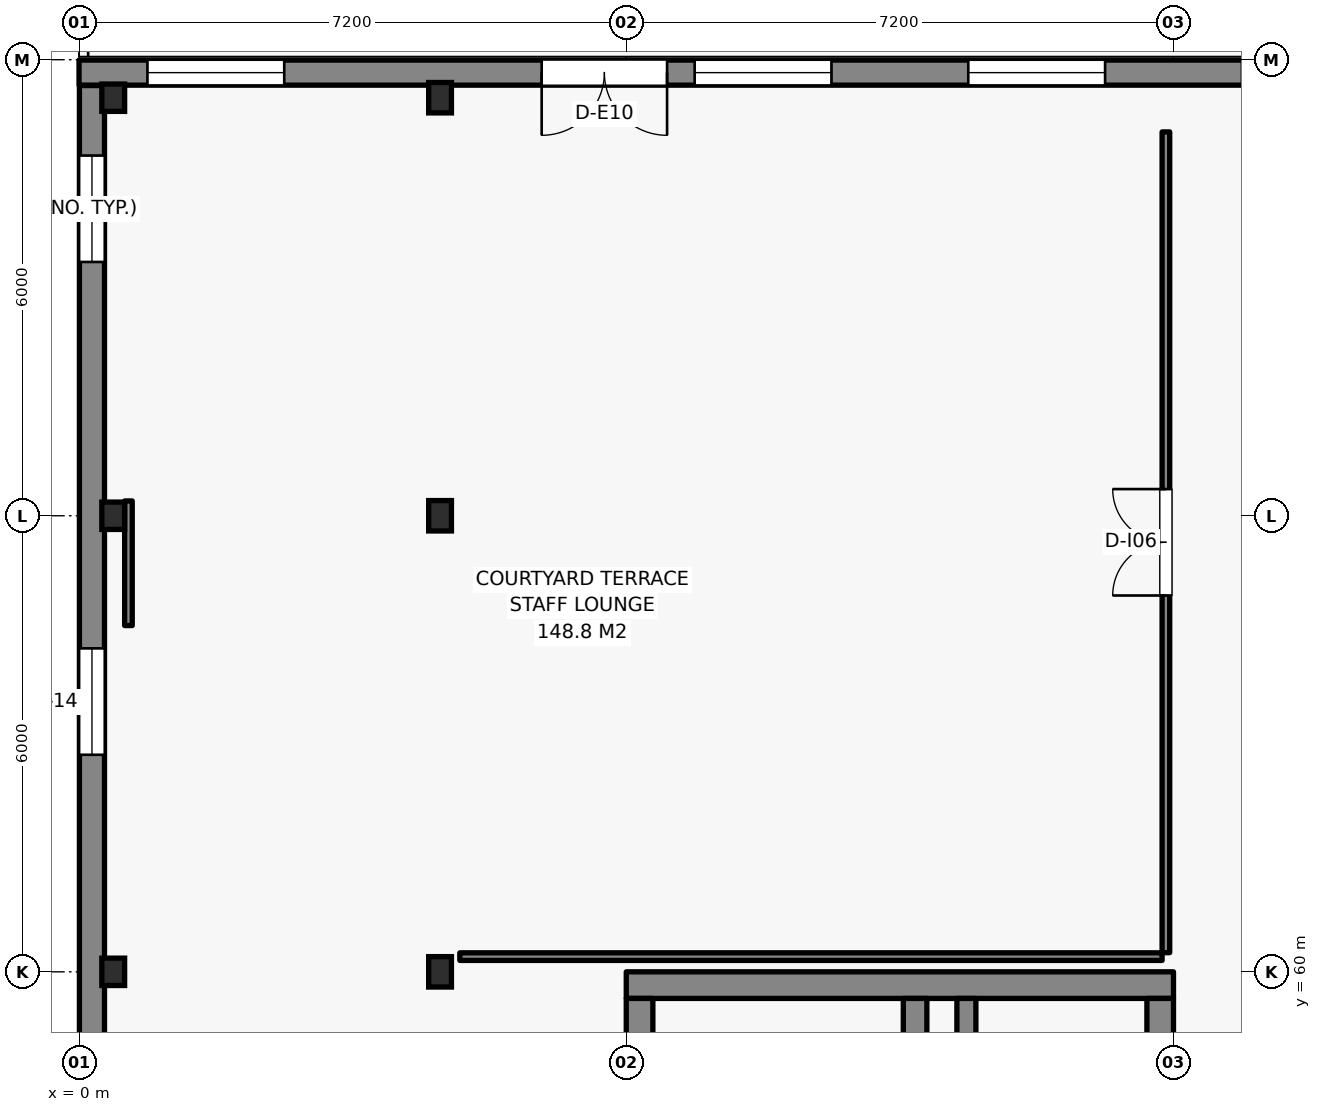
"""IFC4 building model, lengths in metres.
Left out: names, types, materials, properties, quantities, classifications, styles, units other than length and angle.
Written with IfcOpenShell. Run it as: python <this file> out.ifc"""

import sys

from ifc_helpers import new_model, si_unit, direction, frame, frame_2d, origin, origin_2d, place, context, subcontext, project, spatial, rectangle, i_section, extrude, element, fill, save


model = new_model("IFC4")
c1 = context("Model", 3, precision=1e-05, world=origin(), true_north=direction((0.0, 1.0)))
c2 = subcontext(c1, "Body", "Model", "MODEL_VIEW")
j1 = project(units=[si_unit("LENGTHUNIT", "METRE"), si_unit("PLANEANGLEUNIT", "RADIAN")], contexts=[c1])
p1 = place(None, origin())
s1 = spatial("IfcSite", under=j1, at=p1, CompositionType="ELEMENT")
p2 = place(p1, origin())
s2 = spatial("IfcBuilding", under=s1, at=p2, CompositionType="ELEMENT")
p3 = place(p2, frame((0.0, 0.0, 14.7)))
s3 = spatial("IfcBuildingStorey", under=s2, at=p3, CompositionType="ELEMENT", Elevation=14.7)
p4 = place(p3, frame((7.2, 59.825, 0.0), z_axis=(0.0, 0.0, 1.0), x_axis=(1.0, 0.0, 0.0)))
e1 = element("IfcWall", 1, at=p4, inside=s3, PredefinedType="SHEAR", context=c2, shape_type="SweptSolid", body=[
    extrude(rectangle(XDim=7.2, YDim=0.35, at=frame_2d((3.6, 0.0))), origin(), (0.0, 0.0, 1.0), 3.8),
])
p5 = place(p3, frame((7.375, 48.35, 0.0), z_axis=(0.0, 0.0, 1.0), x_axis=(0.0, 1.0, 0.0)))
e2 = element("IfcWall", 2, at=p5, inside=s3, PredefinedType="SHEAR", context=c2, shape_type="SweptSolid", body=[
    extrude(rectangle(XDim=11.3, YDim=0.35, at=frame_2d((5.65, 0.0))), origin(), (0.0, 0.0, 1.0), 3.8),
])
p6 = place(p3, frame((14.225, 48.35, 0.0), z_axis=(0.0, 0.0, 1.0), x_axis=(0.0, 1.0, 0.0)))
e3 = element("IfcWall", 3, at=p6, inside=s3, PredefinedType="SHEAR", context=c2, shape_type="SweptSolid", body=[
    extrude(rectangle(XDim=11.3, YDim=0.35, at=frame_2d((5.65, 0.0))), origin(), (0.0, 0.0, 1.0), 3.8),
])
p7 = place(p6, frame((2.4, 0.0, 0.0)))
e4 = element("IfcOpeningElement", 4, at=p7, cuts=e3, PredefinedType="OPENING", context=c2, shape_type="SweptSolid", body=[
    extrude(rectangle(XDim=1.5, YDim=2.15, at=frame_2d((0.75, 1.075))), frame((0.0, 0.185, 0.0), z_axis=(0.0, -1.0, 0.0), x_axis=(1.0, 0.0, 0.0)), (0.0, 0.0, 1.0), 0.37),
])
p8 = place(p3, frame((11.0, 48.35, 0.0), z_axis=(0.0, 0.0, 1.0), x_axis=(0.0, 1.0, 0.0)))
e5 = element("IfcWall", 5, at=p8, inside=s3, PredefinedType="SHEAR", context=c2, shape_type="SweptSolid", body=[
    extrude(rectangle(XDim=11.3, YDim=0.31, at=frame_2d((5.65, 0.0))), origin(), (0.0, 0.0, 1.0), 3.8),
])
p9 = place(p8, frame((0.45, 0.0, 0.0)))
e6 = element("IfcOpeningElement", 6, at=p9, cuts=e5, PredefinedType="OPENING", context=c2, shape_type="SweptSolid", body=[
    extrude(rectangle(XDim=1.1, YDim=2.15, at=frame_2d((0.55, 1.075))), frame((0.0, 0.165, 0.0), z_axis=(0.0, -1.0, 0.0), x_axis=(1.0, 0.0, 0.0)), (0.0, 0.0, 1.0), 0.33),
])
for number, where, z_axis, x_axis in (
    (7, (0.45, 60.0, 0.0), (0.0, 0.0, 1.0), (1.0, 0.0, 0.0)),
    (8, (0.45, 66.0, 0.0), (0.0, 0.0, 1.0), (1.0, 0.0, 0.0)),
    (9, (0.45, 71.5, 0.0), (0.0, 0.0, 1.0), (1.0, 0.0, 0.0)),
):
    element("IfcColumn", number, at=place(p3, frame(where, z_axis=z_axis, x_axis=x_axis)), inside=s3, PredefinedType="COLUMN", context=c2, shape_type="SweptSolid", body=[
        extrude(i_section(OverallWidth=0.3, OverallDepth=0.36, WebThickness=0.012, FlangeThickness=0.022, FilletRadius=0.027, at=origin_2d()), origin(), (0.0, 0.0, 1.0), 4.05),
    ])
for number, where, z_axis, x_axis in (
    (10, (4.75, 60.0, 0.0), (0.0, 0.0, 1.0), (1.0, 0.0, 0.0)),
    (11, (4.75, 66.0, 0.0), (0.0, 0.0, 1.0), (1.0, 0.0, 0.0)),
    (12, (4.75, 71.5, 0.0), (0.0, 0.0, 1.0), (1.0, 0.0, 0.0)),
):
    element("IfcColumn", number, at=place(p3, frame(where, z_axis=z_axis, x_axis=x_axis)), inside=s3, PredefinedType="COLUMN", context=c2, shape_type="SweptSolid", body=[
        extrude(i_section(OverallWidth=0.3, OverallDepth=0.4, WebThickness=0.013, FlangeThickness=0.024, FilletRadius=0.027, at=origin_2d()), origin(), (0.0, 0.0, 1.0), 4.05),
    ])
p10 = place(p3, frame((21.6, 71.83, 0.0), z_axis=(0.0, 0.0, 1.0), x_axis=(-1.0, 0.0, 0.0)))
e13 = element("IfcWall", 13, at=p10, inside=s3, PredefinedType="SOLIDWALL", context=c2, shape_type="SweptSolid", body=[
    extrude(rectangle(XDim=21.6, YDim=0.33, at=frame_2d((10.8, 0.0))), origin(), (0.0, 0.0, 1.0), 3.78),
])
p11 = place(p10, frame((13.863, 0.0, 0.0)))
e14 = element("IfcOpeningElement", 14, at=p11, cuts=e13, PredefinedType="OPENING", context=c2, shape_type="SweptSolid", body=[
    extrude(rectangle(XDim=1.65, YDim=2.22, at=frame_2d((0.825, 1.11))), frame((0.0, 0.175, 0.0), z_axis=(0.0, -1.0, 0.0), x_axis=(1.0, 0.0, 0.0)), (0.0, 0.0, 1.0), 0.35),
])
p12 = place(p10, frame((0.9, 0.0, 0.82)))
e15 = element("IfcOpeningElement", 15, at=p12, cuts=e13, PredefinedType="OPENING", context=c2, shape_type="SweptSolid", body=[
    extrude(rectangle(XDim=1.8, YDim=2.35, at=frame_2d((0.9, 1.175))), frame((0.0, 0.175, 0.0), z_axis=(0.0, -1.0, 0.0), x_axis=(1.0, 0.0, 0.0)), (0.0, 0.0, 1.0), 0.35),
])
p13 = place(p10, frame((4.5, 0.0, 0.82)))
e16 = element("IfcOpeningElement", 16, at=p13, cuts=e13, PredefinedType="OPENING", context=c2, shape_type="SweptSolid", body=[
    extrude(rectangle(XDim=1.8, YDim=2.35, at=frame_2d((0.9, 1.175))), frame((0.0, 0.175, 0.0), z_axis=(0.0, -1.0, 0.0), x_axis=(1.0, 0.0, 0.0)), (0.0, 0.0, 1.0), 0.35),
])
p14 = place(p10, frame((8.1, 0.0, 0.82)))
e17 = element("IfcOpeningElement", 17, at=p14, cuts=e13, PredefinedType="OPENING", context=c2, shape_type="SweptSolid", body=[
    extrude(rectangle(XDim=1.8, YDim=2.35, at=frame_2d((0.9, 1.175))), frame((0.0, 0.175, 0.0), z_axis=(0.0, -1.0, 0.0), x_axis=(1.0, 0.0, 0.0)), (0.0, 0.0, 1.0), 0.35),
])
p15 = place(p10, frame((11.7, 0.0, 0.82)))
e18 = element("IfcOpeningElement", 18, at=p15, cuts=e13, PredefinedType="OPENING", context=c2, shape_type="SweptSolid", body=[
    extrude(rectangle(XDim=1.8, YDim=2.35, at=frame_2d((0.9, 1.175))), frame((0.0, 0.175, 0.0), z_axis=(0.0, -1.0, 0.0), x_axis=(1.0, 0.0, 0.0)), (0.0, 0.0, 1.0), 0.35),
])
p16 = place(p10, frame((18.9, 0.0, 0.82)))
e19 = element("IfcOpeningElement", 19, at=p16, cuts=e13, PredefinedType="OPENING", context=c2, shape_type="SweptSolid", body=[
    extrude(rectangle(XDim=1.8, YDim=2.35, at=frame_2d((0.9, 1.175))), frame((0.0, 0.175, 0.0), z_axis=(0.0, -1.0, 0.0), x_axis=(1.0, 0.0, 0.0)), (0.0, 0.0, 1.0), 0.35),
])
p17 = place(p3, frame((0.17, 71.66, 0.0), z_axis=(0.0, 0.0, 1.0), x_axis=(0.0, -1.0, 0.0)))
e20 = element("IfcWall", 20, at=p17, inside=s3, PredefinedType="SOLIDWALL", context=c2, shape_type="SweptSolid", body=[
    extrude(rectangle(XDim=35.66, YDim=0.33, at=frame_2d((17.83, 0.0))), origin(), (0.0, 0.0, 1.0), 3.415),
])
p18 = place(p17, frame((0.921, 0.0, 0.82)))
e21 = element("IfcOpeningElement", 21, at=p18, cuts=e20, PredefinedType="OPENING", context=c2, shape_type="SweptSolid", body=[
    extrude(rectangle(XDim=1.4, YDim=2.1, at=frame_2d((0.7, 1.05))), frame((0.0, 0.175, 0.0), z_axis=(0.0, -1.0, 0.0), x_axis=(1.0, 0.0, 0.0)), (0.0, 0.0, 1.0), 0.35),
])
p19 = place(p17, frame((7.405, 0.0, 0.82)))
e22 = element("IfcOpeningElement", 22, at=p19, cuts=e20, PredefinedType="OPENING", context=c2, shape_type="SweptSolid", body=[
    extrude(rectangle(XDim=1.4, YDim=2.1, at=frame_2d((0.7, 1.05))), frame((0.0, 0.175, 0.0), z_axis=(0.0, -1.0, 0.0), x_axis=(1.0, 0.0, 0.0)), (0.0, 0.0, 1.0), 0.35),
])
p20 = place(p17, frame((13.888, 0.0, 0.82)))
e23 = element("IfcOpeningElement", 23, at=p20, cuts=e20, PredefinedType="OPENING", context=c2, shape_type="SweptSolid", body=[
    extrude(rectangle(XDim=1.4, YDim=2.1, at=frame_2d((0.7, 1.05))), frame((0.0, 0.175, 0.0), z_axis=(0.0, -1.0, 0.0), x_axis=(1.0, 0.0, 0.0)), (0.0, 0.0, 1.0), 0.35),
])
p21 = place(p17, frame((20.372, 0.0, 0.82)))
e24 = element("IfcOpeningElement", 24, at=p21, cuts=e20, PredefinedType="OPENING", context=c2, shape_type="SweptSolid", body=[
    extrude(rectangle(XDim=1.4, YDim=2.1, at=frame_2d((0.7, 1.05))), frame((0.0, 0.175, 0.0), z_axis=(0.0, -1.0, 0.0), x_axis=(1.0, 0.0, 0.0)), (0.0, 0.0, 1.0), 0.35),
])
p22 = place(p17, frame((26.855, 0.0, 0.82)))
e25 = element("IfcOpeningElement", 25, at=p22, cuts=e20, PredefinedType="OPENING", context=c2, shape_type="SweptSolid", body=[
    extrude(rectangle(XDim=1.4, YDim=2.1, at=frame_2d((0.7, 1.05))), frame((0.0, 0.175, 0.0), z_axis=(0.0, -1.0, 0.0), x_axis=(1.0, 0.0, 0.0)), (0.0, 0.0, 1.0), 0.35),
])
p23 = place(p17, frame((30.097, 0.0, 0.82)))
e26 = element("IfcOpeningElement", 26, at=p23, cuts=e20, PredefinedType="OPENING", context=c2, shape_type="SweptSolid", body=[
    extrude(rectangle(XDim=1.4, YDim=2.1, at=frame_2d((0.7, 1.05))), frame((0.0, 0.175, 0.0), z_axis=(0.0, -1.0, 0.0), x_axis=(1.0, 0.0, 0.0)), (0.0, 0.0, 1.0), 0.35),
])
p24 = place(p17, frame((33.339, 0.0, 0.82)))
e27 = element("IfcOpeningElement", 27, at=p24, cuts=e20, PredefinedType="OPENING", context=c2, shape_type="SweptSolid", body=[
    extrude(rectangle(XDim=1.4, YDim=2.1, at=frame_2d((0.7, 1.05))), frame((0.0, 0.175, 0.0), z_axis=(0.0, -1.0, 0.0), x_axis=(1.0, 0.0, 0.0)), (0.0, 0.0, 1.0), 0.35),
])
p25 = place(p3, frame((11.675, 57.175, 0.0), z_axis=(0.0, 0.0, 1.0), x_axis=(0.0, 1.0, 0.0)))
e28 = element("IfcWall", 28, at=p25, inside=s3, PredefinedType="SHEAR", context=c2, shape_type="SweptSolid", body=[
    extrude(rectangle(XDim=2.475, YDim=0.25, at=frame_2d((1.237, 0.0))), origin(), (0.0, 0.0, 1.0), 3.8),
])
p26 = place(p3, frame((5.01, 60.2, 0.0), z_axis=(0.0, 0.0, 1.0), x_axis=(1.0, 0.0, 0.0)))
e29 = element("IfcWall", 29, at=p26, inside=s3, PredefinedType="MOVABLE", context=c2, shape_type="SweptSolid", body=[
    extrude(rectangle(XDim=9.24, YDim=0.1, at=frame_2d((4.62, 0.0))), origin(), (0.0, 0.0, 1.0), 3.415),
])
p27 = place(p3, frame((14.3, 60.252, 0.0), z_axis=(0.0, 0.0, 1.0), x_axis=(0.0, 1.0, 0.0)))
e30 = element("IfcWall", 30, at=p27, inside=s3, PredefinedType="MOVABLE", context=c2, shape_type="SweptSolid", body=[
    extrude(rectangle(XDim=10.798, YDim=0.1, at=frame_2d((5.399, 0.0))), origin(), (0.0, 0.0, 1.0), 3.76),
])
p28 = place(p27, frame((4.699, 0.0, 0.0)))
e31 = element("IfcOpeningElement", 31, at=p28, cuts=e30, PredefinedType="OPENING", context=c2, shape_type="SweptSolid", body=[
    extrude(rectangle(XDim=1.4, YDim=2.2, at=frame_2d((0.7, 1.1))), frame((0.0, 0.06, 0.0), z_axis=(0.0, -1.0, 0.0), x_axis=(1.0, 0.0, 0.0)), (0.0, 0.0, 1.0), 0.12),
])
p29 = place(p3, frame((0.65, 66.195, 0.0), z_axis=(0.0, 0.0, 1.0), x_axis=(0.0, -1.0, 0.0)))
e32 = element("IfcWall", 32, at=p29, inside=s3, PredefinedType="MOVABLE", context=c2, shape_type="SweptSolid", body=[
    extrude(rectangle(XDim=1.64, YDim=0.1, at=frame_2d((0.82, 0.0))), origin(), (0.0, 0.0, 1.0), 3.415),
])
p30 = place(p11, origin())
e33 = element("IfcDoor", 33, at=p30, inside=s3, OperationType="DOUBLE_DOOR_SINGLE_SWING", PredefinedType="DOOR", context=c2, shape_type="SweptSolid", body=[
    extrude(rectangle(XDim=1.65, YDim=2.22, at=frame_2d((0.825, 1.11))), frame((0.0, 0.025, 0.0), z_axis=(0.0, -1.0, 0.0), x_axis=(1.0, 0.0, 0.0)), (0.0, 0.0, 1.0), 0.05),
])
fill(e14, e33)
p31 = place(p14, origin())
e34 = element("IfcWindow", 34, at=p31, inside=s3, PartitioningType="SINGLE_PANEL", PredefinedType="WINDOW", context=c2, shape_type="SweptSolid", body=[
    extrude(rectangle(XDim=1.8, YDim=2.35, at=frame_2d((0.9, 1.175))), frame((0.0, 0.03, 0.0), z_axis=(0.0, -1.0, 0.0), x_axis=(1.0, 0.0, 0.0)), (0.0, 0.0, 1.0), 0.06),
])
fill(e17, e34)
p32 = place(p15, origin())
e35 = element("IfcWindow", 35, at=p32, inside=s3, PartitioningType="SINGLE_PANEL", PredefinedType="WINDOW", context=c2, shape_type="SweptSolid", body=[
    extrude(rectangle(XDim=1.8, YDim=2.35, at=frame_2d((0.9, 1.175))), frame((0.0, 0.03, 0.0), z_axis=(0.0, -1.0, 0.0), x_axis=(1.0, 0.0, 0.0)), (0.0, 0.0, 1.0), 0.06),
])
fill(e18, e35)
p33 = place(p16, origin())
e36 = element("IfcWindow", 36, at=p33, inside=s3, PartitioningType="SINGLE_PANEL", PredefinedType="WINDOW", context=c2, shape_type="SweptSolid", body=[
    extrude(rectangle(XDim=1.8, YDim=2.35, at=frame_2d((0.9, 1.175))), frame((0.0, 0.03, 0.0), z_axis=(0.0, -1.0, 0.0), x_axis=(1.0, 0.0, 0.0)), (0.0, 0.0, 1.0), 0.06),
])
fill(e19, e36)
p34 = place(p18, origin())
e37 = element("IfcWindow", 37, at=p34, inside=s3, PartitioningType="SINGLE_PANEL", PredefinedType="WINDOW", context=c2, shape_type="SweptSolid", body=[
    extrude(rectangle(XDim=1.4, YDim=2.1, at=frame_2d((0.7, 1.05))), frame((0.0, 0.03, 0.0), z_axis=(0.0, -1.0, 0.0), x_axis=(1.0, 0.0, 0.0)), (0.0, 0.0, 1.0), 0.06),
])
fill(e21, e37)
p35 = place(p19, origin())
e38 = element("IfcWindow", 38, at=p35, inside=s3, PartitioningType="SINGLE_PANEL", PredefinedType="WINDOW", context=c2, shape_type="SweptSolid", body=[
    extrude(rectangle(XDim=1.4, YDim=2.1, at=frame_2d((0.7, 1.05))), frame((0.0, 0.03, 0.0), z_axis=(0.0, -1.0, 0.0), x_axis=(1.0, 0.0, 0.0)), (0.0, 0.0, 1.0), 0.06),
])
fill(e22, e38)
p36 = place(p28, origin())
e39 = element("IfcDoor", 39, at=p36, inside=s3, OperationType="DOUBLE_DOOR_SINGLE_SWING", PredefinedType="DOOR", context=c2, shape_type="SweptSolid", body=[
    extrude(rectangle(XDim=1.4, YDim=2.2, at=frame_2d((0.7, 1.1))), frame((0.0, 0.025, 0.0), z_axis=(0.0, -1.0, 0.0), x_axis=(1.0, 0.0, 0.0)), (0.0, 0.0, 1.0), 0.05),
])
fill(e31, e39)
save(model, sys.argv[1])
